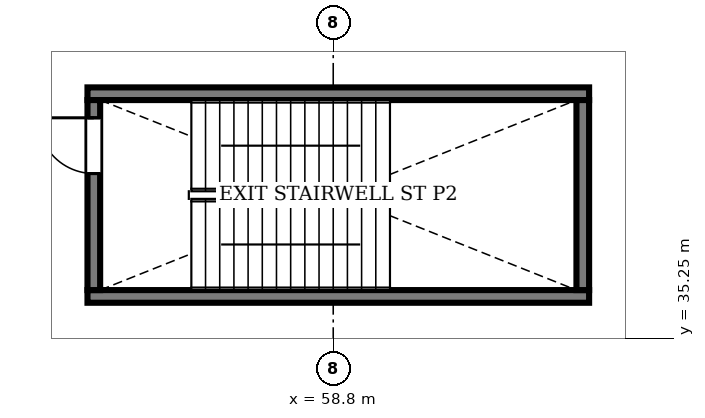
"""IFC4 building model, lengths in metres.
Left out: names, types, materials, properties, quantities, classifications, styles, units other than length and angle.
Written with IfcOpenShell. Run it as: python <this file> out.ifc"""

import sys

from ifc_helpers import new_model, si_unit, direction, frame, frame_2d, origin, place, context, subcontext, project, spatial, rectangle, extrude, source, transform, mapped, element, fill, save


model = new_model("IFC4")
c1 = context("Model", 3, precision=1e-05, world=origin(), true_north=direction((0.0, 1.0)))
c2 = subcontext(c1, "Body", "Model", "MODEL_VIEW")
j1 = project(units=[si_unit("LENGTHUNIT", "METRE"), si_unit("PLANEANGLEUNIT", "RADIAN")], contexts=[c1])
p1 = place(None, origin())
s1 = spatial("IfcSite", under=j1, at=p1, CompositionType="ELEMENT")
p2 = place(p1, origin())
s2 = spatial("IfcBuilding", under=s1, at=p2, CompositionType="ELEMENT")
p3 = place(p2, frame((0.0, 0.0, 17.0)))
s3 = spatial("IfcBuildingStorey", under=s2, at=p3, CompositionType="ELEMENT", Elevation=17.0)
m1 = source(origin(), c2, "Body", "SweptSolid", [
    extrude(rectangle(XDim=9.9, YDim=0.25, at=frame_2d((4.95, 0.0))), origin(), (0.0, 0.0, 1.0), 5.2),
])
for number, where, z_axis, x_axis in (
    (1, (53.95, 36.075, 0.0), (0.0, 0.0, 1.0), (1.0, 0.0, 0.0)),
    (2, (53.95, 40.075, 0.0), (0.0, 0.0, 1.0), (1.0, 0.0, 0.0)),
):
    element("IfcWall", number, at=place(p3, frame(where, z_axis=z_axis, x_axis=x_axis)), inside=s3, PredefinedType="SOLIDWALL", context=c2, shape_type="MappedRepresentation", body=[
        mapped(m1, transform((0.0, 0.0, 0.0), scale=1.0)),
    ])
m2 = source(origin(), c2, "Body", "SweptSolid", [
    extrude(rectangle(XDim=3.75, YDim=0.25, at=frame_2d((1.875, 0.0))), origin(), (0.0, 0.0, 1.0), 5.2),
])
p4 = place(p3, frame((63.725, 36.2, 0.0), z_axis=(0.0, 0.0, 1.0), x_axis=(0.0, 1.0, 0.0)))
e3 = element("IfcWall", 3, at=p4, inside=s3, PredefinedType="SOLIDWALL", context=c2, shape_type="MappedRepresentation", body=[
    mapped(m2, transform((0.0, 0.0, 0.0), scale=1.0)),
])
p5 = place(p3, frame((54.075, 36.2, 0.0), z_axis=(0.0, 0.0, 1.0), x_axis=(0.0, 1.0, 0.0)))
e4 = element("IfcWall", 4, at=p5, inside=s3, PredefinedType="SOLIDWALL", context=c2, shape_type="MappedRepresentation", body=[
    mapped(m2, transform((0.0, 0.0, 0.0), scale=1.0)),
])
m3 = source(origin(), c2, "Body", "SweptSolid", [
    extrude(rectangle(XDim=1.1, YDim=2.2, at=frame_2d((0.55, 1.1))), frame((0.0, 0.135, 0.0), z_axis=(0.0, -1.0, 0.0), x_axis=(1.0, 0.0, 0.0)), (0.0, 0.0, 1.0), 0.27),
])
p6 = place(p5, frame((2.3, 0.0, 0.0)))
e5 = element("IfcOpeningElement", 5, at=p6, cuts=e4, PredefinedType="OPENING", context=c2, shape_type="MappedRepresentation", body=[
    mapped(m3, transform((0.0, 0.0, 0.0), scale=1.0)),
])
m4 = source(origin(), c2, "Body", "SweptSolid", [
    extrude(rectangle(XDim=1.1, YDim=2.2, at=frame_2d((0.55, 1.1))), frame((0.0, 0.025, 0.0), z_axis=(0.0, -1.0, 0.0), x_axis=(1.0, 0.0, 0.0)), (0.0, 0.0, 1.0), 0.05),
])
p7 = place(p6, origin())
e6 = element("IfcDoor", 6, at=p7, inside=s3, OperationType="SINGLE_SWING_RIGHT", PredefinedType="DOOR", context=c2, shape_type="MappedRepresentation", body=[
    mapped(m4, transform((0.0, 0.0, 0.0), scale=1.0)),
])
fill(e5, e6)
save(model, sys.argv[1])
